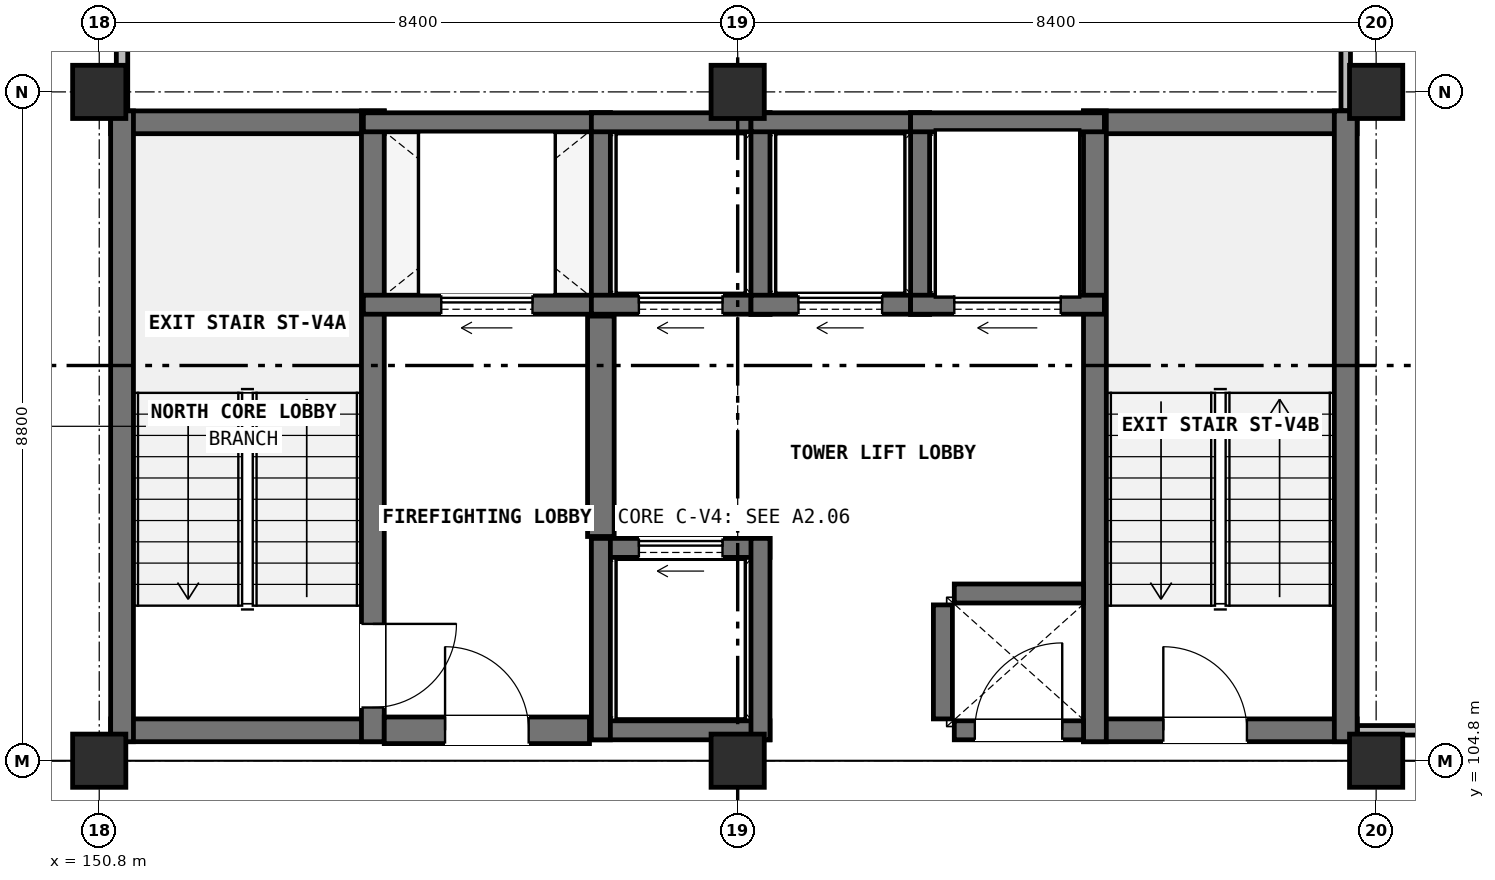
"""IFC4 building model, lengths in metres.
Left out: names, types, materials, properties, quantities, classifications, styles, units other than length and angle.
Written with IfcOpenShell. Run it as: python <this file> out.ifc"""

import sys

from ifc_helpers import new_model, si_unit, direction, frame, frame_2d, origin, origin_2d, place, context, subcontext, project, spatial, rectangle, extrude, element, fill, save


model = new_model("IFC4")
c1 = context("Model", 3, precision=1e-05, world=origin(), true_north=direction((0.0, 1.0)))
c2 = subcontext(c1, "Body", "Model", "MODEL_VIEW")
j1 = project(units=[si_unit("LENGTHUNIT", "METRE"), si_unit("PLANEANGLEUNIT", "RADIAN")], contexts=[c1])
p1 = place(None, origin())
s1 = spatial("IfcSite", under=j1, at=p1, CompositionType="ELEMENT")
p2 = place(p1, origin())
s2 = spatial("IfcBuilding", under=s1, at=p2, CompositionType="ELEMENT")
p3 = place(p2, frame((0.0, 0.0, 40.6)))
s3 = spatial("IfcBuildingStorey", under=s2, at=p3, CompositionType="ELEMENT", Elevation=40.6)
for number, where, z_axis, x_axis in (
    (1, (150.8, 104.8, 0.0), (0.0, 0.0, 1.0), (1.0, 0.0, 0.0)),
    (2, (150.8, 113.6, 0.0), (0.0, 0.0, 1.0), (1.0, 0.0, 0.0)),
    (3, (159.2, 104.8, 0.0), (0.0, 0.0, 1.0), (1.0, 0.0, 0.0)),
    (4, (159.2, 113.6, 0.0), (0.0, 0.0, 1.0), (1.0, 0.0, 0.0)),
    (5, (167.6, 104.8, 0.0), (0.0, 0.0, 1.0), (1.0, 0.0, 0.0)),
    (6, (167.6, 113.6, 0.0), (0.0, 0.0, 1.0), (1.0, 0.0, 0.0)),
):
    element("IfcColumn", number, at=place(p3, frame(where, z_axis=z_axis, x_axis=x_axis)), inside=s3, PredefinedType="COLUMN", context=c2, shape_type="SweptSolid", body=[
        extrude(rectangle(XDim=0.7, YDim=0.7, at=origin_2d()), origin(), (0.0, 0.0, 1.0), 3.8),
    ])
for number, where, z_axis, x_axis in (
    (7, (150.95, 105.2, 0.0), (0.0, 0.0, 1.0), (1.0, 0.0, 0.0)),
    (8, (150.95, 113.2, 0.0), (0.0, 0.0, 1.0), (1.0, 0.0, 0.0)),
):
    element("IfcWall", number, at=place(p3, frame(where, z_axis=z_axis, x_axis=x_axis)), inside=s3, PredefinedType="SHEAR", context=c2, shape_type="SweptSolid", body=[
        extrude(rectangle(XDim=3.6, YDim=0.3, at=frame_2d((1.8, 0.0))), origin(), (0.0, 0.0, 1.0), 3.8),
    ])
p4 = place(p3, frame((151.1, 105.05, 0.0), z_axis=(0.0, 0.0, 1.0), x_axis=(0.0, 1.0, 0.0)))
e9 = element("IfcWall", 9, at=p4, inside=s3, PredefinedType="SHEAR", context=c2, shape_type="SweptSolid", body=[
    extrude(rectangle(XDim=8.3, YDim=0.3, at=frame_2d((4.15, 0.0))), origin(), (0.0, 0.0, 1.0), 3.8),
])
p5 = place(p3, frame((154.4, 105.05, 0.0), z_axis=(0.0, 0.0, 1.0), x_axis=(0.0, 1.0, 0.0)))
e10 = element("IfcWall", 10, at=p5, inside=s3, PredefinedType="SHEAR", context=c2, shape_type="SweptSolid", body=[
    extrude(rectangle(XDim=8.3, YDim=0.3, at=frame_2d((4.15, 0.0))), origin(), (0.0, 0.0, 1.0), 3.8),
])
p6 = place(p5, frame((0.45, 0.0, 0.0)))
e11 = element("IfcOpeningElement", 11, at=p6, cuts=e10, PredefinedType="OPENING", context=c2, shape_type="SweptSolid", body=[
    extrude(rectangle(XDim=1.1, YDim=2.2, at=frame_2d((0.55, 1.1))), frame((0.0, 0.16, 0.0), z_axis=(0.0, -1.0, 0.0), x_axis=(1.0, 0.0, 0.0)), (0.0, 0.0, 1.0), 0.32),
])
p7 = place(p3, frame((163.75, 105.2, 0.0), z_axis=(0.0, 0.0, 1.0), x_axis=(1.0, 0.0, 0.0)))
e12 = element("IfcWall", 12, at=p7, inside=s3, PredefinedType="SHEAR", context=c2, shape_type="SweptSolid", body=[
    extrude(rectangle(XDim=3.6, YDim=0.3, at=frame_2d((1.8, 0.0))), origin(), (0.0, 0.0, 1.0), 3.8),
])
p8 = place(p7, frame((1.05, 0.0, 0.0)))
e13 = element("IfcOpeningElement", 13, at=p8, cuts=e12, PredefinedType="OPENING", context=c2, shape_type="SweptSolid", body=[
    extrude(rectangle(XDim=1.1, YDim=2.2, at=frame_2d((0.55, 1.1))), frame((0.0, 0.16, 0.0), z_axis=(0.0, -1.0, 0.0), x_axis=(1.0, 0.0, 0.0)), (0.0, 0.0, 1.0), 0.32),
])
p9 = place(p3, frame((163.75, 113.2, 0.0), z_axis=(0.0, 0.0, 1.0), x_axis=(1.0, 0.0, 0.0)))
e14 = element("IfcWall", 14, at=p9, inside=s3, PredefinedType="SHEAR", context=c2, shape_type="SweptSolid", body=[
    extrude(rectangle(XDim=3.6, YDim=0.3, at=frame_2d((1.8, 0.0))), origin(), (0.0, 0.0, 1.0), 3.8),
])
for number, where, z_axis, x_axis in (
    (15, (163.9, 105.05, 0.0), (0.0, 0.0, 1.0), (0.0, 1.0, 0.0)),
    (16, (167.2, 105.05, 0.0), (0.0, 0.0, 1.0), (0.0, 1.0, 0.0)),
):
    element("IfcWall", number, at=place(p3, frame(where, z_axis=z_axis, x_axis=x_axis)), inside=s3, PredefinedType="SHEAR", context=c2, shape_type="SweptSolid", body=[
        extrude(rectangle(XDim=8.3, YDim=0.3, at=frame_2d((4.15, 0.0))), origin(), (0.0, 0.0, 1.0), 3.8),
    ])
p10 = place(p3, frame((154.275, 110.8, 0.0), z_axis=(0.0, 0.0, 1.0), x_axis=(1.0, 0.0, 0.0)))
e17 = element("IfcWall", 17, at=p10, inside=s3, PredefinedType="SOLIDWALL", context=c2, shape_type="SweptSolid", body=[
    extrude(rectangle(XDim=3.25, YDim=0.25, at=frame_2d((1.625, 0.0))), origin(), (0.0, 0.0, 1.0), 3.48),
])
p11 = place(p10, frame((1.025, 0.0, 0.0)))
e18 = element("IfcOpeningElement", 18, at=p11, cuts=e17, PredefinedType="OPENING", context=c2, shape_type="SweptSolid", body=[
    extrude(rectangle(XDim=1.2, YDim=2.2, at=frame_2d((0.6, 1.1))), frame((0.0, 0.135, 0.0), z_axis=(0.0, -1.0, 0.0), x_axis=(1.0, 0.0, 0.0)), (0.0, 0.0, 1.0), 0.27),
])
p12 = place(p3, frame((154.275, 113.2, 0.0), z_axis=(0.0, 0.0, 1.0), x_axis=(1.0, 0.0, 0.0)))
e19 = element("IfcWall", 19, at=p12, inside=s3, PredefinedType="SOLIDWALL", context=c2, shape_type="SweptSolid", body=[
    extrude(rectangle(XDim=3.25, YDim=0.25, at=frame_2d((1.625, 0.0))), origin(), (0.0, 0.0, 1.0), 3.48),
])
p13 = place(p3, frame((157.4, 110.675, 0.0), z_axis=(0.0, 0.0, 1.0), x_axis=(0.0, 1.0, 0.0)))
e20 = element("IfcWall", 20, at=p13, inside=s3, PredefinedType="SOLIDWALL", context=c2, shape_type="SweptSolid", body=[
    extrude(rectangle(XDim=2.65, YDim=0.25, at=frame_2d((1.325, 0.0))), origin(), (0.0, 0.0, 1.0), 3.48),
])
p14 = place(p3, frame((157.275, 110.8, 0.0), z_axis=(0.0, 0.0, 1.0), x_axis=(1.0, 0.0, 0.0)))
e21 = element("IfcWall", 21, at=p14, inside=s3, PredefinedType="SOLIDWALL", context=c2, shape_type="SweptSolid", body=[
    extrude(rectangle(XDim=2.35, YDim=0.25, at=frame_2d((1.175, 0.0))), origin(), (0.0, 0.0, 1.0), 3.48),
])
p15 = place(p14, frame((0.625, 0.0, 0.0)))
e22 = element("IfcOpeningElement", 22, at=p15, cuts=e21, PredefinedType="OPENING", context=c2, shape_type="SweptSolid", body=[
    extrude(rectangle(XDim=1.1, YDim=2.2, at=frame_2d((0.55, 1.1))), frame((0.0, 0.135, 0.0), z_axis=(0.0, -1.0, 0.0), x_axis=(1.0, 0.0, 0.0)), (0.0, 0.0, 1.0), 0.27),
])
p16 = place(p3, frame((157.275, 113.2, 0.0), z_axis=(0.0, 0.0, 1.0), x_axis=(1.0, 0.0, 0.0)))
e23 = element("IfcWall", 23, at=p16, inside=s3, PredefinedType="SOLIDWALL", context=c2, shape_type="SweptSolid", body=[
    extrude(rectangle(XDim=2.35, YDim=0.25, at=frame_2d((1.175, 0.0))), origin(), (0.0, 0.0, 1.0), 3.48),
])
p17 = place(p3, frame((159.5, 110.675, 0.0), z_axis=(0.0, 0.0, 1.0), x_axis=(0.0, 1.0, 0.0)))
e24 = element("IfcWall", 24, at=p17, inside=s3, PredefinedType="SOLIDWALL", context=c2, shape_type="SweptSolid", body=[
    extrude(rectangle(XDim=2.65, YDim=0.25, at=frame_2d((1.325, 0.0))), origin(), (0.0, 0.0, 1.0), 3.48),
])
p18 = place(p3, frame((159.375, 110.8, 0.0), z_axis=(0.0, 0.0, 1.0), x_axis=(1.0, 0.0, 0.0)))
e25 = element("IfcWall", 25, at=p18, inside=s3, PredefinedType="SOLIDWALL", context=c2, shape_type="SweptSolid", body=[
    extrude(rectangle(XDim=2.35, YDim=0.25, at=frame_2d((1.175, 0.0))), origin(), (0.0, 0.0, 1.0), 3.48),
])
p19 = place(p18, frame((0.625, 0.0, 0.0)))
e26 = element("IfcOpeningElement", 26, at=p19, cuts=e25, PredefinedType="OPENING", context=c2, shape_type="SweptSolid", body=[
    extrude(rectangle(XDim=1.1, YDim=2.2, at=frame_2d((0.55, 1.1))), frame((0.0, 0.135, 0.0), z_axis=(0.0, -1.0, 0.0), x_axis=(1.0, 0.0, 0.0)), (0.0, 0.0, 1.0), 0.27),
])
p20 = place(p3, frame((159.375, 113.2, 0.0), z_axis=(0.0, 0.0, 1.0), x_axis=(1.0, 0.0, 0.0)))
e27 = element("IfcWall", 27, at=p20, inside=s3, PredefinedType="SOLIDWALL", context=c2, shape_type="SweptSolid", body=[
    extrude(rectangle(XDim=2.35, YDim=0.25, at=frame_2d((1.175, 0.0))), origin(), (0.0, 0.0, 1.0), 3.48),
])
p21 = place(p3, frame((161.6, 110.675, 0.0), z_axis=(0.0, 0.0, 1.0), x_axis=(0.0, 1.0, 0.0)))
e28 = element("IfcWall", 28, at=p21, inside=s3, PredefinedType="SOLIDWALL", context=c2, shape_type="SweptSolid", body=[
    extrude(rectangle(XDim=2.65, YDim=0.25, at=frame_2d((1.325, 0.0))), origin(), (0.0, 0.0, 1.0), 3.48),
])
p22 = place(p3, frame((157.275, 105.2, 0.0), z_axis=(0.0, 0.0, 1.0), x_axis=(1.0, 0.0, 0.0)))
e29 = element("IfcWall", 29, at=p22, inside=s3, PredefinedType="SOLIDWALL", context=c2, shape_type="SweptSolid", body=[
    extrude(rectangle(XDim=2.35, YDim=0.25, at=frame_2d((1.175, 0.0))), origin(), (0.0, 0.0, 1.0), 3.48),
])
p23 = place(p3, frame((157.275, 107.6, 0.0), z_axis=(0.0, 0.0, 1.0), x_axis=(1.0, 0.0, 0.0)))
e30 = element("IfcWall", 30, at=p23, inside=s3, PredefinedType="SOLIDWALL", context=c2, shape_type="SweptSolid", body=[
    extrude(rectangle(XDim=2.35, YDim=0.25, at=frame_2d((1.175, 0.0))), origin(), (0.0, 0.0, 1.0), 3.48),
])
p24 = place(p23, frame((0.625, 0.0, 0.0)))
e31 = element("IfcOpeningElement", 31, at=p24, cuts=e30, PredefinedType="OPENING", context=c2, shape_type="SweptSolid", body=[
    extrude(rectangle(XDim=1.1, YDim=2.2, at=frame_2d((0.55, 1.1))), frame((0.0, 0.135, 0.0), z_axis=(0.0, -1.0, 0.0), x_axis=(1.0, 0.0, 0.0)), (0.0, 0.0, 1.0), 0.27),
])
for number, where, z_axis, x_axis in (
    (32, (157.4, 105.075, 0.0), (0.0, 0.0, 1.0), (0.0, 1.0, 0.0)),
    (33, (159.5, 105.075, 0.0), (0.0, 0.0, 1.0), (0.0, 1.0, 0.0)),
):
    element("IfcWall", number, at=place(p3, frame(where, z_axis=z_axis, x_axis=x_axis)), inside=s3, PredefinedType="SOLIDWALL", context=c2, shape_type="SweptSolid", body=[
        extrude(rectangle(XDim=2.65, YDim=0.25, at=frame_2d((1.325, 0.0))), origin(), (0.0, 0.0, 1.0), 3.48),
    ])
p25 = place(p3, frame((161.475, 110.8, 0.0), z_axis=(0.0, 0.0, 1.0), x_axis=(1.0, 0.0, 0.0)))
e34 = element("IfcWall", 34, at=p25, inside=s3, PredefinedType="SOLIDWALL", context=c2, shape_type="SweptSolid", body=[
    extrude(rectangle(XDim=2.55, YDim=0.25, at=frame_2d((1.275, 0.0))), origin(), (0.0, 0.0, 1.0), 3.48),
])
p26 = place(p25, frame((0.575, 0.0, 0.0)))
e35 = element("IfcOpeningElement", 35, at=p26, cuts=e34, PredefinedType="OPENING", context=c2, shape_type="SweptSolid", body=[
    extrude(rectangle(XDim=1.4, YDim=2.3, at=frame_2d((0.7, 1.15))), frame((0.0, 0.135, 0.0), z_axis=(0.0, -1.0, 0.0), x_axis=(1.0, 0.0, 0.0)), (0.0, 0.0, 1.0), 0.27),
])
p27 = place(p3, frame((161.475, 113.2, 0.0), z_axis=(0.0, 0.0, 1.0), x_axis=(1.0, 0.0, 0.0)))
e36 = element("IfcWall", 36, at=p27, inside=s3, PredefinedType="SOLIDWALL", context=c2, shape_type="SweptSolid", body=[
    extrude(rectangle(XDim=2.55, YDim=0.25, at=frame_2d((1.275, 0.0))), origin(), (0.0, 0.0, 1.0), 3.48),
])
p28 = place(p3, frame((157.4, 107.75, 0.0), z_axis=(0.0, 0.0, 1.0), x_axis=(0.0, 1.0, 0.0)))
e37 = element("IfcWall", 37, at=p28, inside=s3, PredefinedType="SHEAR", context=c2, shape_type="SweptSolid", body=[
    extrude(rectangle(XDim=2.9, YDim=0.35, at=frame_2d((1.45, 0.0))), origin(), (0.0, 0.0, 1.0), 3.48),
])
p29 = place(p3, frame((154.55, 105.2, 0.0), z_axis=(0.0, 0.0, 1.0), x_axis=(1.0, 0.0, 0.0)))
e38 = element("IfcWall", 38, at=p29, inside=s3, PredefinedType="SHEAR", context=c2, shape_type="SweptSolid", body=[
    extrude(rectangle(XDim=2.7, YDim=0.35, at=frame_2d((1.35, 0.0))), origin(), (0.0, 0.0, 1.0), 3.48),
])
p30 = place(p29, frame((0.8, 0.0, 0.0)))
e39 = element("IfcOpeningElement", 39, at=p30, cuts=e38, PredefinedType="OPENING", context=c2, shape_type="SweptSolid", body=[
    extrude(rectangle(XDim=1.1, YDim=2.2, at=frame_2d((0.55, 1.1))), frame((0.0, 0.185, 0.0), z_axis=(0.0, -1.0, 0.0), x_axis=(1.0, 0.0, 0.0)), (0.0, 0.0, 1.0), 0.37),
])
p31 = place(p3, frame((161.9, 105.35, 0.0), z_axis=(0.0, 0.0, 1.0), x_axis=(0.0, 1.0, 0.0)))
e40 = element("IfcWall", 40, at=p31, inside=s3, PredefinedType="SOLIDWALL", context=c2, shape_type="SweptSolid", body=[
    extrude(rectangle(XDim=1.5, YDim=0.25, at=frame_2d((0.75, 0.0))), origin(), (0.0, 0.0, 1.0), 3.48),
])
p32 = place(p3, frame((162.05, 107.0, 0.0), z_axis=(0.0, 0.0, 1.0), x_axis=(1.0, 0.0, 0.0)))
e41 = element("IfcWall", 41, at=p32, inside=s3, PredefinedType="SOLIDWALL", context=c2, shape_type="SweptSolid", body=[
    extrude(rectangle(XDim=1.7, YDim=0.25, at=frame_2d((0.85, 0.0))), origin(), (0.0, 0.0, 1.0), 3.48),
])
p33 = place(p3, frame((162.05, 105.2, 0.0), z_axis=(0.0, 0.0, 1.0), x_axis=(1.0, 0.0, 0.0)))
e42 = element("IfcWall", 42, at=p33, inside=s3, PredefinedType="SOLIDWALL", context=c2, shape_type="SweptSolid", body=[
    extrude(rectangle(XDim=1.7, YDim=0.25, at=frame_2d((0.85, 0.0))), origin(), (0.0, 0.0, 1.0), 3.48),
])
p34 = place(p33, frame((0.27, 0.0, 0.0)))
e43 = element("IfcOpeningElement", 43, at=p34, cuts=e42, PredefinedType="OPENING", context=c2, shape_type="SweptSolid", body=[
    extrude(rectangle(XDim=1.15, YDim=2.2, at=frame_2d((0.575, 1.1))), frame((0.0, 0.135, 0.0), z_axis=(0.0, -1.0, 0.0), x_axis=(1.0, 0.0, 0.0)), (0.0, 0.0, 1.0), 0.27),
])
p35 = place(p3, frame((167.355, 105.2, 0.0), z_axis=(0.0, 0.0, 1.0), x_axis=(1.0, 0.0, 0.0)))
e44 = element("IfcWall", 44, at=p35, inside=s3, PredefinedType="PARTITIONING", context=c2, shape_type="SweptSolid", body=[
    extrude(rectangle(XDim=4.245, YDim=0.125, at=frame_2d((2.123, 0.0))), origin(), (0.0, 0.0, 1.0), 3.045),
])
p36 = place(p35, frame((1.633, 0.0, 0.0)))
e45 = element("IfcOpeningElement", 45, at=p36, cuts=e44, PredefinedType="OPENING", context=c2, shape_type="SweptSolid", body=[
    extrude(rectangle(XDim=0.98, YDim=2.1, at=frame_2d((0.49, 1.05))), frame((0.0, 0.073, 0.0), z_axis=(0.0, -1.0, 0.0), x_axis=(1.0, 0.0, 0.0)), (0.0, 0.0, 1.0), 0.145),
])
p37 = place(p3, frame((151.1, 113.355, 0.0), z_axis=(0.0, 0.0, 1.0), x_axis=(0.0, 1.0, 0.0)))
e46 = element("IfcWall", 46, at=p37, inside=s3, PredefinedType="PARTITIONING", context=c2, shape_type="SweptSolid", body=[
    extrude(rectangle(XDim=6.045, YDim=0.15, at=frame_2d((3.022, 0.0))), origin(), (0.0, 0.0, 1.0), 3.045),
])
p38 = place(p37, frame((2.302, 0.0, 0.0)))
e47 = element("IfcOpeningElement", 47, at=p38, cuts=e46, PredefinedType="OPENING", context=c2, shape_type="SweptSolid", body=[
    extrude(rectangle(XDim=1.44, YDim=2.26, at=frame_2d((0.72, 1.13))), frame((0.0, 0.085, 0.0), z_axis=(0.0, -1.0, 0.0), x_axis=(1.0, 0.0, 0.0)), (0.0, 0.0, 1.0), 0.17),
])
p39 = place(p3, frame((167.2, 113.355, 0.0), z_axis=(0.0, 0.0, 1.0), x_axis=(0.0, 1.0, 0.0)))
e48 = element("IfcWall", 48, at=p39, inside=s3, PredefinedType="PARTITIONING", context=c2, shape_type="SweptSolid", body=[
    extrude(rectangle(XDim=8.695, YDim=0.125, at=frame_2d((4.348, 0.0))), origin(), (0.0, 0.0, 1.0), 3.045),
])
p40 = place(p6, frame((1.1, 0.0, 0.0), z_axis=(0.0, 0.0, 1.0), x_axis=(-1.0, 0.0, 0.0)))
e49 = element("IfcDoor", 49, at=p40, inside=s3, OperationType="SINGLE_SWING_RIGHT", PredefinedType="DOOR", context=c2, shape_type="SweptSolid", body=[
    extrude(rectangle(XDim=1.1, YDim=2.2, at=frame_2d((0.55, 1.1))), frame((0.0, 0.025, 0.0), z_axis=(0.0, -1.0, 0.0), x_axis=(1.0, 0.0, 0.0)), (0.0, 0.0, 1.0), 0.05),
])
fill(e11, e49)
p41 = place(p8, origin())
e50 = element("IfcDoor", 50, at=p41, inside=s3, OperationType="SINGLE_SWING_LEFT", PredefinedType="DOOR", context=c2, shape_type="SweptSolid", body=[
    extrude(rectangle(XDim=1.1, YDim=2.2, at=frame_2d((0.55, 1.1))), frame((0.0, 0.025, 0.0), z_axis=(0.0, -1.0, 0.0), x_axis=(1.0, 0.0, 0.0)), (0.0, 0.0, 1.0), 0.05),
])
fill(e13, e50)
p42 = place(p11, origin())
e51 = element("IfcDoor", 51, at=p42, inside=s3, OperationType="SLIDING_TO_LEFT", PredefinedType="DOOR", context=c2, shape_type="SweptSolid", body=[
    extrude(rectangle(XDim=1.2, YDim=2.2, at=frame_2d((0.6, 1.1))), frame((0.0, 0.025, 0.0), z_axis=(0.0, -1.0, 0.0), x_axis=(1.0, 0.0, 0.0)), (0.0, 0.0, 1.0), 0.05),
])
fill(e18, e51)
p43 = place(p15, origin())
e52 = element("IfcDoor", 52, at=p43, inside=s3, OperationType="SLIDING_TO_LEFT", PredefinedType="DOOR", context=c2, shape_type="SweptSolid", body=[
    extrude(rectangle(XDim=1.1, YDim=2.2, at=frame_2d((0.55, 1.1))), frame((0.0, 0.025, 0.0), z_axis=(0.0, -1.0, 0.0), x_axis=(1.0, 0.0, 0.0)), (0.0, 0.0, 1.0), 0.05),
])
fill(e22, e52)
p44 = place(p19, origin())
e53 = element("IfcDoor", 53, at=p44, inside=s3, OperationType="SLIDING_TO_LEFT", PredefinedType="DOOR", context=c2, shape_type="SweptSolid", body=[
    extrude(rectangle(XDim=1.1, YDim=2.2, at=frame_2d((0.55, 1.1))), frame((0.0, 0.025, 0.0), z_axis=(0.0, -1.0, 0.0), x_axis=(1.0, 0.0, 0.0)), (0.0, 0.0, 1.0), 0.05),
])
fill(e26, e53)
p45 = place(p24, origin())
e54 = element("IfcDoor", 54, at=p45, inside=s3, OperationType="SLIDING_TO_LEFT", PredefinedType="DOOR", context=c2, shape_type="SweptSolid", body=[
    extrude(rectangle(XDim=1.1, YDim=2.2, at=frame_2d((0.55, 1.1))), frame((0.0, 0.025, 0.0), z_axis=(0.0, -1.0, 0.0), x_axis=(1.0, 0.0, 0.0)), (0.0, 0.0, 1.0), 0.05),
])
fill(e31, e54)
p46 = place(p26, origin())
e55 = element("IfcDoor", 55, at=p46, inside=s3, OperationType="SLIDING_TO_LEFT", PredefinedType="DOOR", context=c2, shape_type="SweptSolid", body=[
    extrude(rectangle(XDim=1.4, YDim=2.3, at=frame_2d((0.7, 1.15))), frame((0.0, 0.025, 0.0), z_axis=(0.0, -1.0, 0.0), x_axis=(1.0, 0.0, 0.0)), (0.0, 0.0, 1.0), 0.05),
])
fill(e35, e55)
p47 = place(p30, origin())
e56 = element("IfcDoor", 56, at=p47, inside=s3, OperationType="SINGLE_SWING_LEFT", PredefinedType="DOOR", context=c2, shape_type="SweptSolid", body=[
    extrude(rectangle(XDim=1.1, YDim=2.2, at=frame_2d((0.55, 1.1))), frame((0.0, 0.025, 0.0), z_axis=(0.0, -1.0, 0.0), x_axis=(1.0, 0.0, 0.0)), (0.0, 0.0, 1.0), 0.05),
])
fill(e39, e56)
p48 = place(p34, origin())
e57 = element("IfcDoor", 57, at=p48, inside=s3, OperationType="SINGLE_SWING_RIGHT", PredefinedType="DOOR", context=c2, shape_type="SweptSolid", body=[
    extrude(rectangle(XDim=1.15, YDim=2.2, at=frame_2d((0.575, 1.1))), frame((0.0, 0.025, 0.0), z_axis=(0.0, -1.0, 0.0), x_axis=(1.0, 0.0, 0.0)), (0.0, 0.0, 1.0), 0.05),
])
fill(e43, e57)
save(model, sys.argv[1])
